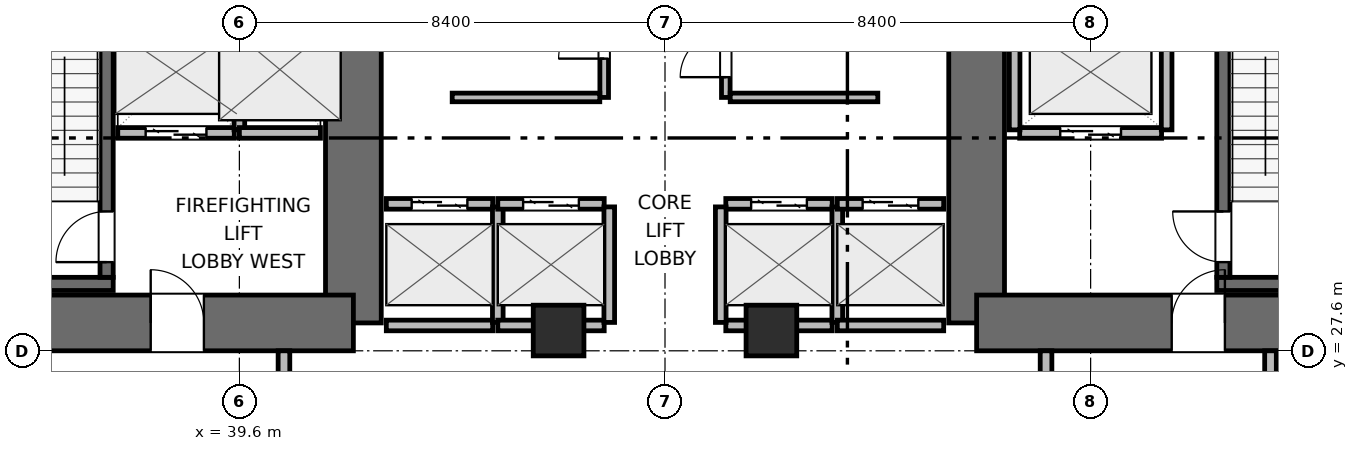
"""IFC4 building model, lengths in metres.
Left out: names, types, materials, properties, quantities, classifications, styles, units other than length and angle.
Written with IfcOpenShell. Run it as: python <this file> out.ifc"""

import sys

from ifc_helpers import new_model, si_unit, direction, frame, frame_2d, origin, origin_2d, place, context, subcontext, project, spatial, rectangle, extrude, element, fill, save


model = new_model("IFC4")
c1 = context("Model", 3, precision=1e-05, world=origin(), true_north=direction((0.0, 1.0)))
c2 = subcontext(c1, "Body", "Model", "MODEL_VIEW")
j1 = project(units=[si_unit("LENGTHUNIT", "METRE"), si_unit("PLANEANGLEUNIT", "RADIAN")], contexts=[c1])
p1 = place(None, origin())
s1 = spatial("IfcSite", under=j1, at=p1, CompositionType="ELEMENT")
p2 = place(p1, origin())
s2 = spatial("IfcBuilding", under=s1, at=p2, CompositionType="ELEMENT")
p3 = place(p2, origin())
s3 = spatial("IfcBuildingStorey", under=s2, at=p3, CompositionType="ELEMENT", Elevation=0.0)
p4 = place(p3, frame((41.85, 28.15, 0.0), z_axis=(0.0, 0.0, 1.0), x_axis=(0.0, 1.0, 0.0)))
e1 = element("IfcWall", 1, at=p4, inside=s3, PredefinedType="SHEAR", context=c2, shape_type="SweptSolid", body=[
    extrude(rectangle(XDim=6.25, YDim=1.1, at=frame_2d((3.125, 0.0))), origin(), (0.0, 0.0, 1.0), 4.5),
])
p5 = place(p3, frame((32.95, 28.15, 0.0), z_axis=(0.0, 0.0, 1.0), x_axis=(1.0, 0.0, 0.0)))
e2 = element("IfcWall", 2, at=p5, inside=s3, PredefinedType="SHEAR", context=c2, shape_type="SweptSolid", body=[
    extrude(rectangle(XDim=8.9, YDim=1.1, at=frame_2d((4.45, 0.0))), origin(), (0.0, 0.0, 1.0), 4.5),
])
p6 = place(p5, frame((4.9, 0.0, 0.0)))
e3 = element("IfcOpeningElement", 3, at=p6, cuts=e2, PredefinedType="OPENING", context=c2, shape_type="SweptSolid", body=[
    extrude(rectangle(XDim=1.05, YDim=2.04, at=frame_2d((0.525, 1.02))), frame((0.0, 0.56, 0.0), z_axis=(0.0, -1.0, 0.0), x_axis=(1.0, 0.0, 0.0)), (0.0, 0.0, 1.0), 1.12),
])
p7 = place(p3, frame((54.15, 28.15, 0.0), z_axis=(0.0, 0.0, 1.0), x_axis=(0.0, 1.0, 0.0)))
e4 = element("IfcWall", 4, at=p7, inside=s3, PredefinedType="SHEAR", context=c2, shape_type="SweptSolid", body=[
    extrude(rectangle(XDim=7.65, YDim=1.1, at=frame_2d((3.825, 0.0))), origin(), (0.0, 0.0, 1.0), 4.5),
])
p8 = place(p3, frame((54.15, 28.15, 0.0), z_axis=(0.0, 0.0, 1.0), x_axis=(1.0, 0.0, 0.0)))
e5 = element("IfcWall", 5, at=p8, inside=s3, PredefinedType="SHEAR", context=c2, shape_type="SweptSolid", body=[
    extrude(rectangle(XDim=8.9, YDim=1.1, at=frame_2d((4.45, 0.0))), origin(), (0.0, 0.0, 1.0), 4.5),
])
p9 = place(p8, frame((3.85, 0.0, 0.0)))
e6 = element("IfcOpeningElement", 6, at=p9, cuts=e5, PredefinedType="OPENING", context=c2, shape_type="SweptSolid", body=[
    extrude(rectangle(XDim=1.05, YDim=2.04, at=frame_2d((0.525, 1.02))), frame((0.0, 0.56, 0.0), z_axis=(0.0, -1.0, 0.0), x_axis=(1.0, 0.0, 0.0)), (0.0, 0.0, 1.0), 1.12),
])
p10 = place(p3, frame((33.5, 28.92, 0.0), z_axis=(0.0, 0.0, 1.0), x_axis=(1.0, 0.0, 0.0)))
e7 = element("IfcWall", 7, at=p10, inside=s3, PredefinedType="SHEAR", context=c2, shape_type="SweptSolid", body=[
    extrude(rectangle(XDim=3.61, YDim=0.26, at=frame_2d((1.805, 0.0))), origin(), (0.0, 0.0, 1.0), 4.5),
])
p11 = place(p3, frame((36.98, 29.05, 0.0), z_axis=(0.0, 0.0, 1.0), x_axis=(0.0, 1.0, 0.0)))
e8 = element("IfcWall", 8, at=p11, inside=s3, PredefinedType="SHEAR", context=c2, shape_type="SweptSolid", body=[
    extrude(rectangle(XDim=7.6, YDim=0.26, at=frame_2d((3.8, 0.0))), origin(), (0.0, 0.0, 1.0), 4.5),
])
p12 = place(p11, frame((0.3, 0.0, 0.0)))
e9 = element("IfcOpeningElement", 9, at=p12, cuts=e8, PredefinedType="OPENING", context=c2, shape_type="SweptSolid", body=[
    extrude(rectangle(XDim=1.0, YDim=2.04, at=frame_2d((0.5, 1.02))), frame((0.0, 0.14, 0.0), z_axis=(0.0, -1.0, 0.0), x_axis=(1.0, 0.0, 0.0)), (0.0, 0.0, 1.0), 0.28),
])
p13 = place(p3, frame((58.89, 28.92, 0.0), z_axis=(0.0, 0.0, 1.0), x_axis=(1.0, 0.0, 0.0)))
e10 = element("IfcWall", 10, at=p13, inside=s3, PredefinedType="SHEAR", context=c2, shape_type="SweptSolid", body=[
    extrude(rectangle(XDim=3.61, YDim=0.26, at=frame_2d((1.805, 0.0))), origin(), (0.0, 0.0, 1.0), 4.5),
])
p14 = place(p3, frame((59.02, 29.05, 0.0), z_axis=(0.0, 0.0, 1.0), x_axis=(0.0, 1.0, 0.0)))
e11 = element("IfcWall", 11, at=p14, inside=s3, PredefinedType="SHEAR", context=c2, shape_type="SweptSolid", body=[
    extrude(rectangle(XDim=7.6, YDim=0.26, at=frame_2d((3.8, 0.0))), origin(), (0.0, 0.0, 1.0), 4.5),
])
p15 = place(p14, frame((0.3, 0.0, 0.0)))
e12 = element("IfcOpeningElement", 12, at=p15, cuts=e11, PredefinedType="OPENING", context=c2, shape_type="SweptSolid", body=[
    extrude(rectangle(XDim=1.0, YDim=2.04, at=frame_2d((0.5, 1.02))), frame((0.0, 0.14, 0.0), z_axis=(0.0, -1.0, 0.0), x_axis=(1.0, 0.0, 0.0)), (0.0, 0.0, 1.0), 0.28),
])
for number, where, z_axis, x_axis in (
    (13, (45.9, 28.0, 0.0), (0.0, 0.0, 1.0), (1.0, 0.0, 0.0)),
    (14, (50.1, 28.0, 0.0), (0.0, 0.0, 1.0), (1.0, 0.0, 0.0)),
):
    element("IfcColumn", number, at=place(p3, frame(where, z_axis=z_axis, x_axis=x_axis)), inside=s3, PredefinedType="COLUMN", context=c2, shape_type="SweptSolid", body=[
        extrude(rectangle(XDim=1.0, YDim=1.0, at=origin_2d()), origin(), (0.0, 0.0, 1.0), 4.5),
    ])
p16 = place(p3, frame((37.2, 31.9, 0.0), z_axis=(0.0, 0.0, 1.0), x_axis=(1.0, 0.0, 0.0)))
e15 = element("IfcWall", 15, at=p16, inside=s3, PredefinedType="PARTITIONING", context=c2, shape_type="SweptSolid", body=[
    extrude(rectangle(XDim=2.3, YDim=0.21, at=frame_2d((1.15, 0.0))), origin(), (0.0, 0.0, 1.0), 4.18),
])
p17 = place(p16, frame((0.55, 0.0, 0.0)))
e16 = element("IfcOpeningElement", 16, at=p17, cuts=e15, PredefinedType="OPENING", context=c2, shape_type="SweptSolid", body=[
    extrude(rectangle(XDim=1.2, YDim=2.04, at=frame_2d((0.6, 1.02))), frame((0.0, 0.115, 0.0), z_axis=(0.0, -1.0, 0.0), x_axis=(1.0, 0.0, 0.0)), (0.0, 0.0, 1.0), 0.23),
])
p18 = place(p3, frame((39.6, 31.96, 0.0), z_axis=(0.0, 0.0, 1.0), x_axis=(0.0, 1.0, 0.0)))
e17 = element("IfcWall", 17, at=p18, inside=s3, PredefinedType="PARTITIONING", context=c2, shape_type="SweptSolid", body=[
    extrude(rectangle(XDim=2.28, YDim=0.21, at=frame_2d((1.14, 0.0))), origin(), (0.0, 0.0, 1.0), 4.18),
])
p19 = place(p3, frame((55.0, 31.9, 0.0), z_axis=(0.0, 0.0, 1.0), x_axis=(1.0, 0.0, 0.0)))
e18 = element("IfcWall", 18, at=p19, inside=s3, PredefinedType="PARTITIONING", context=c2, shape_type="SweptSolid", body=[
    extrude(rectangle(XDim=2.8, YDim=0.21, at=frame_2d((1.4, 0.0))), origin(), (0.0, 0.0, 1.0), 4.18),
])
p20 = place(p19, frame((0.8, 0.0, 0.0)))
e19 = element("IfcOpeningElement", 19, at=p20, cuts=e18, PredefinedType="OPENING", context=c2, shape_type="SweptSolid", body=[
    extrude(rectangle(XDim=1.2, YDim=2.04, at=frame_2d((0.6, 1.02))), frame((0.0, 0.115, 0.0), z_axis=(0.0, -1.0, 0.0), x_axis=(1.0, 0.0, 0.0)), (0.0, 0.0, 1.0), 0.23),
])
for number, where, z_axis, x_axis in (
    (20, (54.9, 31.96, 0.0), (0.0, 0.0, 1.0), (0.0, 1.0, 0.0)),
    (21, (57.9, 31.96, 0.0), (0.0, 0.0, 1.0), (0.0, 1.0, 0.0)),
):
    element("IfcWall", number, at=place(p3, frame(where, z_axis=z_axis, x_axis=x_axis)), inside=s3, PredefinedType="PARTITIONING", context=c2, shape_type="SweptSolid", body=[
        extrude(rectangle(XDim=2.28, YDim=0.21, at=frame_2d((1.14, 0.0))), origin(), (0.0, 0.0, 1.0), 4.18),
    ])
p21 = place(p3, frame((39.6, 31.9, 0.0), z_axis=(0.0, 0.0, 1.0), x_axis=(1.0, 0.0, 0.0)))
e22 = element("IfcWall", 22, at=p21, inside=s3, PredefinedType="PARTITIONING", context=c2, shape_type="SweptSolid", body=[
    extrude(rectangle(XDim=1.6, YDim=0.21, at=frame_2d((0.8, 0.0))), origin(), (0.0, 0.0, 1.0), 4.18),
])
p22 = place(p3, frame((42.5, 30.5, 0.0), z_axis=(0.0, 0.0, 1.0), x_axis=(1.0, 0.0, 0.0)))
e23 = element("IfcWall", 23, at=p22, inside=s3, PredefinedType="PARTITIONING", context=c2, shape_type="SweptSolid", body=[
    extrude(rectangle(XDim=2.1, YDim=0.21, at=frame_2d((1.05, 0.0))), origin(), (0.0, 0.0, 1.0), 4.18),
])
p23 = place(p22, frame((0.5, 0.0, 0.0)))
e24 = element("IfcOpeningElement", 24, at=p23, cuts=e23, PredefinedType="OPENING", context=c2, shape_type="SweptSolid", body=[
    extrude(rectangle(XDim=1.1, YDim=2.04, at=frame_2d((0.55, 1.02))), frame((0.0, 0.115, 0.0), z_axis=(0.0, -1.0, 0.0), x_axis=(1.0, 0.0, 0.0)), (0.0, 0.0, 1.0), 0.23),
])
p24 = place(p3, frame((42.5, 28.1, 0.0), z_axis=(0.0, 0.0, 1.0), x_axis=(1.0, 0.0, 0.0)))
e25 = element("IfcWall", 25, at=p24, inside=s3, PredefinedType="PARTITIONING", context=c2, shape_type="SweptSolid", body=[
    extrude(rectangle(XDim=2.1, YDim=0.21, at=frame_2d((1.05, 0.0))), origin(), (0.0, 0.0, 1.0), 3.065),
])
p25 = place(p3, frame((44.7, 28.16, 0.0), z_axis=(0.0, 0.0, 1.0), x_axis=(0.0, 1.0, 0.0)))
e26 = element("IfcWall", 26, at=p25, inside=s3, PredefinedType="PARTITIONING", context=c2, shape_type="SweptSolid", body=[
    extrude(rectangle(XDim=2.28, YDim=0.21, at=frame_2d((1.14, 0.0))), origin(), (0.0, 0.0, 1.0), 4.18),
])
p26 = place(p3, frame((44.7, 30.5, 0.0), z_axis=(0.0, 0.0, 1.0), x_axis=(1.0, 0.0, 0.0)))
e27 = element("IfcWall", 27, at=p26, inside=s3, PredefinedType="PARTITIONING", context=c2, shape_type="SweptSolid", body=[
    extrude(rectangle(XDim=2.1, YDim=0.21, at=frame_2d((1.05, 0.0))), origin(), (0.0, 0.0, 1.0), 4.18),
])
p27 = place(p26, frame((0.5, 0.0, 0.0)))
e28 = element("IfcOpeningElement", 28, at=p27, cuts=e27, PredefinedType="OPENING", context=c2, shape_type="SweptSolid", body=[
    extrude(rectangle(XDim=1.1, YDim=2.04, at=frame_2d((0.55, 1.02))), frame((0.0, 0.115, 0.0), z_axis=(0.0, -1.0, 0.0), x_axis=(1.0, 0.0, 0.0)), (0.0, 0.0, 1.0), 0.23),
])
p28 = place(p3, frame((44.7, 28.1, 0.0), z_axis=(0.0, 0.0, 1.0), x_axis=(1.0, 0.0, 0.0)))
e29 = element("IfcWall", 29, at=p28, inside=s3, PredefinedType="PARTITIONING", context=c2, shape_type="SweptSolid", body=[
    extrude(rectangle(XDim=2.1, YDim=0.21, at=frame_2d((1.05, 0.0))), origin(), (0.0, 0.0, 1.0), 3.065),
])
p29 = place(p3, frame((46.9, 28.16, 0.0), z_axis=(0.0, 0.0, 1.0), x_axis=(0.0, 1.0, 0.0)))
e30 = element("IfcWall", 30, at=p29, inside=s3, PredefinedType="PARTITIONING", context=c2, shape_type="SweptSolid", body=[
    extrude(rectangle(XDim=2.28, YDim=0.21, at=frame_2d((1.14, 0.0))), origin(), (0.0, 0.0, 1.0), 4.18),
])
p30 = place(p3, frame((49.2, 30.5, 0.0), z_axis=(0.0, 0.0, 1.0), x_axis=(1.0, 0.0, 0.0)))
e31 = element("IfcWall", 31, at=p30, inside=s3, PredefinedType="PARTITIONING", context=c2, shape_type="SweptSolid", body=[
    extrude(rectangle(XDim=2.1, YDim=0.21, at=frame_2d((1.05, 0.0))), origin(), (0.0, 0.0, 1.0), 4.18),
])
p31 = place(p30, frame((0.5, 0.0, 0.0)))
e32 = element("IfcOpeningElement", 32, at=p31, cuts=e31, PredefinedType="OPENING", context=c2, shape_type="SweptSolid", body=[
    extrude(rectangle(XDim=1.1, YDim=2.04, at=frame_2d((0.55, 1.02))), frame((0.0, 0.115, 0.0), z_axis=(0.0, -1.0, 0.0), x_axis=(1.0, 0.0, 0.0)), (0.0, 0.0, 1.0), 0.23),
])
p32 = place(p3, frame((49.2, 28.1, 0.0), z_axis=(0.0, 0.0, 1.0), x_axis=(1.0, 0.0, 0.0)))
e33 = element("IfcWall", 33, at=p32, inside=s3, PredefinedType="PARTITIONING", context=c2, shape_type="SweptSolid", body=[
    extrude(rectangle(XDim=2.1, YDim=0.21, at=frame_2d((1.05, 0.0))), origin(), (0.0, 0.0, 1.0), 3.065),
])
for number, where, z_axis, x_axis in (
    (34, (49.1, 28.16, 0.0), (0.0, 0.0, 1.0), (0.0, 1.0, 0.0)),
    (35, (51.4, 28.16, 0.0), (0.0, 0.0, 1.0), (0.0, 1.0, 0.0)),
):
    element("IfcWall", number, at=place(p3, frame(where, z_axis=z_axis, x_axis=x_axis)), inside=s3, PredefinedType="PARTITIONING", context=c2, shape_type="SweptSolid", body=[
        extrude(rectangle(XDim=2.28, YDim=0.21, at=frame_2d((1.14, 0.0))), origin(), (0.0, 0.0, 1.0), 4.18),
    ])
p33 = place(p3, frame((51.4, 30.5, 0.0), z_axis=(0.0, 0.0, 1.0), x_axis=(1.0, 0.0, 0.0)))
e36 = element("IfcWall", 36, at=p33, inside=s3, PredefinedType="PARTITIONING", context=c2, shape_type="SweptSolid", body=[
    extrude(rectangle(XDim=2.1, YDim=0.21, at=frame_2d((1.05, 0.0))), origin(), (0.0, 0.0, 1.0), 4.18),
])
p34 = place(p33, frame((0.5, 0.0, 0.0)))
e37 = element("IfcOpeningElement", 37, at=p34, cuts=e36, PredefinedType="OPENING", context=c2, shape_type="SweptSolid", body=[
    extrude(rectangle(XDim=1.1, YDim=2.04, at=frame_2d((0.55, 1.02))), frame((0.0, 0.115, 0.0), z_axis=(0.0, -1.0, 0.0), x_axis=(1.0, 0.0, 0.0)), (0.0, 0.0, 1.0), 0.23),
])
p35 = place(p3, frame((51.4, 28.1, 0.0), z_axis=(0.0, 0.0, 1.0), x_axis=(1.0, 0.0, 0.0)))
e38 = element("IfcWall", 38, at=p35, inside=s3, PredefinedType="PARTITIONING", context=c2, shape_type="SweptSolid", body=[
    extrude(rectangle(XDim=2.1, YDim=0.21, at=frame_2d((1.05, 0.0))), origin(), (0.0, 0.0, 1.0), 3.065),
])
p36 = place(p3, frame((40.48, 0.285, 0.0), z_axis=(0.0, 0.0, 1.0), x_axis=(0.0, 1.0, 0.0)))
e39 = element("IfcWall", 39, at=p36, inside=s3, PredefinedType="PARTITIONING", context=c2, shape_type="SweptSolid", body=[
    extrude(rectangle(XDim=27.315, YDim=0.23, at=frame_2d((13.658, 0.0))), origin(), (0.0, 0.0, 1.0), 4.18),
])
p37 = place(p36, frame((11.0, 0.0, 0.0)))
e40 = element("IfcOpeningElement", 40, at=p37, cuts=e39, PredefinedType="OPENING", context=c2, shape_type="SweptSolid", body=[
    extrude(rectangle(XDim=1.8, YDim=2.06, at=frame_2d((0.9, 1.03))), frame((0.0, 0.125, 0.0), z_axis=(0.0, -1.0, 0.0), x_axis=(1.0, 0.0, 0.0)), (0.0, 0.0, 1.0), 0.25),
])
p38 = place(p3, frame((55.52, 0.285, 0.0), z_axis=(0.0, 0.0, 1.0), x_axis=(0.0, 1.0, 0.0)))
e41 = element("IfcWall", 41, at=p38, inside=s3, PredefinedType="PARTITIONING", context=c2, shape_type="SweptSolid", body=[
    extrude(rectangle(XDim=27.315, YDim=0.23, at=frame_2d((13.658, 0.0))), origin(), (0.0, 0.0, 1.0), 4.18),
])
p39 = place(p38, frame((11.0, 0.0, 0.0)))
e42 = element("IfcOpeningElement", 42, at=p39, cuts=e41, PredefinedType="OPENING", context=c2, shape_type="SweptSolid", body=[
    extrude(rectangle(XDim=1.8, YDim=2.06, at=frame_2d((0.9, 1.03))), frame((0.0, 0.125, 0.0), z_axis=(0.0, -1.0, 0.0), x_axis=(1.0, 0.0, 0.0)), (0.0, 0.0, 1.0), 0.25),
])
p40 = place(p3, frame((59.95, 0.355, 0.0), z_axis=(0.0, 0.0, 1.0), x_axis=(0.0, 1.0, 0.0)))
e43 = element("IfcWall", 43, at=p40, inside=s3, PredefinedType="PARTITIONING", context=c2, shape_type="SweptSolid", body=[
    extrude(rectangle(XDim=27.245, YDim=0.23, at=frame_2d((13.623, 0.0))), origin(), (0.0, 0.0, 1.0), 4.18),
])
p41 = place(p40, frame((13.5, 0.0, 0.0)))
e44 = element("IfcOpeningElement", 44, at=p41, cuts=e43, PredefinedType="OPENING", context=c2, shape_type="SweptSolid", body=[
    extrude(rectangle(XDim=1.0, YDim=2.04, at=frame_2d((0.5, 1.02))), frame((0.0, 0.125, 0.0), z_axis=(0.0, -1.0, 0.0), x_axis=(1.0, 0.0, 0.0)), (0.0, 0.0, 1.0), 0.25),
])
p42 = place(p3, frame((46.8, 32.6, 0.0), z_axis=(0.0, 0.0, 1.0), x_axis=(0.0, 1.0, 0.0)))
e45 = element("IfcWall", 45, at=p42, inside=s3, PredefinedType="PARTITIONING", context=c2, shape_type="SweptSolid", body=[
    extrude(rectangle(XDim=3.8, YDim=0.17, at=frame_2d((1.9, 0.0))), origin(), (0.0, 0.0, 1.0), 4.18),
])
p43 = place(p42, frame((0.766, 0.0, 0.0)))
e46 = element("IfcOpeningElement", 46, at=p43, cuts=e45, PredefinedType="OPENING", context=c2, shape_type="SweptSolid", body=[
    extrude(rectangle(XDim=0.9, YDim=2.02, at=frame_2d((0.45, 1.01))), frame((0.0, 0.095, 0.0), z_axis=(0.0, -1.0, 0.0), x_axis=(1.0, 0.0, 0.0)), (0.0, 0.0, 1.0), 0.19),
])
p44 = place(p42, frame((2.666, 0.0, 0.0)))
e47 = element("IfcOpeningElement", 47, at=p44, cuts=e45, PredefinedType="OPENING", context=c2, shape_type="SweptSolid", body=[
    extrude(rectangle(XDim=0.9, YDim=2.02, at=frame_2d((0.45, 1.01))), frame((0.0, 0.095, 0.0), z_axis=(0.0, -1.0, 0.0), x_axis=(1.0, 0.0, 0.0)), (0.0, 0.0, 1.0), 0.19),
])
p45 = place(p3, frame((43.8, 32.6, 0.0), z_axis=(0.0, 0.0, 1.0), x_axis=(1.0, 0.0, 0.0)))
e48 = element("IfcWall", 48, at=p45, inside=s3, PredefinedType="PARTITIONING", context=c2, shape_type="SweptSolid", body=[
    extrude(rectangle(XDim=2.913, YDim=0.17, at=frame_2d((1.457, 0.0))), origin(), (0.0, 0.0, 1.0), 4.18),
])
p46 = place(p3, frame((49.2, 32.6, 0.0), z_axis=(0.0, 0.0, 1.0), x_axis=(0.0, 1.0, 0.0)))
e49 = element("IfcWall", 49, at=p46, inside=s3, PredefinedType="PARTITIONING", context=c2, shape_type="SweptSolid", body=[
    extrude(rectangle(XDim=3.4, YDim=0.17, at=frame_2d((1.7, 0.0))), origin(), (0.0, 0.0, 1.0), 4.18),
])
p47 = place(p46, frame((0.4, 0.0, 0.0)))
e50 = element("IfcOpeningElement", 50, at=p47, cuts=e49, PredefinedType="OPENING", context=c2, shape_type="SweptSolid", body=[
    extrude(rectangle(XDim=0.9, YDim=2.02, at=frame_2d((0.45, 1.01))), frame((0.0, 0.095, 0.0), z_axis=(0.0, -1.0, 0.0), x_axis=(1.0, 0.0, 0.0)), (0.0, 0.0, 1.0), 0.19),
])
p48 = place(p46, frame((2.1, 0.0, 0.0)))
e51 = element("IfcOpeningElement", 51, at=p48, cuts=e49, PredefinedType="OPENING", context=c2, shape_type="SweptSolid", body=[
    extrude(rectangle(XDim=0.9, YDim=2.02, at=frame_2d((0.45, 1.01))), frame((0.0, 0.095, 0.0), z_axis=(0.0, -1.0, 0.0), x_axis=(1.0, 0.0, 0.0)), (0.0, 0.0, 1.0), 0.19),
])
p49 = place(p3, frame((49.287, 32.6, 0.0), z_axis=(0.0, 0.0, 1.0), x_axis=(1.0, 0.0, 0.0)))
e52 = element("IfcWall", 52, at=p49, inside=s3, PredefinedType="PARTITIONING", context=c2, shape_type="SweptSolid", body=[
    extrude(rectangle(XDim=2.913, YDim=0.17, at=frame_2d((1.457, 0.0))), origin(), (0.0, 0.0, 1.0), 4.18),
])
p50 = place(p12, origin())
e53 = element("IfcDoor", 53, at=p50, inside=s3, OperationType="SINGLE_SWING_LEFT", PredefinedType="DOOR", context=c2, shape_type="SweptSolid", body=[
    extrude(rectangle(XDim=1.0, YDim=2.04, at=frame_2d((0.5, 1.02))), frame((0.0, 0.025, 0.0), z_axis=(0.0, -1.0, 0.0), x_axis=(1.0, 0.0, 0.0)), (0.0, 0.0, 1.0), 0.05),
])
fill(e9, e53)
p51 = place(p15, origin())
e54 = element("IfcDoor", 54, at=p51, inside=s3, OperationType="SINGLE_SWING_RIGHT", PredefinedType="DOOR", context=c2, shape_type="SweptSolid", body=[
    extrude(rectangle(XDim=1.0, YDim=2.04, at=frame_2d((0.5, 1.02))), frame((0.0, 0.025, 0.0), z_axis=(0.0, -1.0, 0.0), x_axis=(1.0, 0.0, 0.0)), (0.0, 0.0, 1.0), 0.05),
])
fill(e12, e54)
p52 = place(p17, origin())
e55 = element("IfcDoor", 55, at=p52, inside=s3, OperationType="DOUBLE_DOOR_SLIDING", PredefinedType="DOOR", context=c2, shape_type="SweptSolid", body=[
    extrude(rectangle(XDim=1.2, YDim=2.04, at=frame_2d((0.6, 1.02))), frame((0.0, 0.025, 0.0), z_axis=(0.0, -1.0, 0.0), x_axis=(1.0, 0.0, 0.0)), (0.0, 0.0, 1.0), 0.05),
])
fill(e16, e55)
p53 = place(p20, origin())
e56 = element("IfcDoor", 56, at=p53, inside=s3, OperationType="DOUBLE_DOOR_SLIDING", PredefinedType="DOOR", context=c2, shape_type="SweptSolid", body=[
    extrude(rectangle(XDim=1.2, YDim=2.04, at=frame_2d((0.6, 1.02))), frame((0.0, 0.025, 0.0), z_axis=(0.0, -1.0, 0.0), x_axis=(1.0, 0.0, 0.0)), (0.0, 0.0, 1.0), 0.05),
])
fill(e19, e56)
p54 = place(p23, origin())
e57 = element("IfcDoor", 57, at=p54, inside=s3, OperationType="DOUBLE_DOOR_SLIDING", PredefinedType="DOOR", context=c2, shape_type="SweptSolid", body=[
    extrude(rectangle(XDim=1.1, YDim=2.04, at=frame_2d((0.55, 1.02))), frame((0.0, 0.025, 0.0), z_axis=(0.0, -1.0, 0.0), x_axis=(1.0, 0.0, 0.0)), (0.0, 0.0, 1.0), 0.05),
])
fill(e24, e57)
p55 = place(p27, origin())
e58 = element("IfcDoor", 58, at=p55, inside=s3, OperationType="DOUBLE_DOOR_SLIDING", PredefinedType="DOOR", context=c2, shape_type="SweptSolid", body=[
    extrude(rectangle(XDim=1.1, YDim=2.04, at=frame_2d((0.55, 1.02))), frame((0.0, 0.025, 0.0), z_axis=(0.0, -1.0, 0.0), x_axis=(1.0, 0.0, 0.0)), (0.0, 0.0, 1.0), 0.05),
])
fill(e28, e58)
p56 = place(p31, origin())
e59 = element("IfcDoor", 59, at=p56, inside=s3, OperationType="DOUBLE_DOOR_SLIDING", PredefinedType="DOOR", context=c2, shape_type="SweptSolid", body=[
    extrude(rectangle(XDim=1.1, YDim=2.04, at=frame_2d((0.55, 1.02))), frame((0.0, 0.025, 0.0), z_axis=(0.0, -1.0, 0.0), x_axis=(1.0, 0.0, 0.0)), (0.0, 0.0, 1.0), 0.05),
])
fill(e32, e59)
p57 = place(p34, origin())
e60 = element("IfcDoor", 60, at=p57, inside=s3, OperationType="DOUBLE_DOOR_SLIDING", PredefinedType="DOOR", context=c2, shape_type="SweptSolid", body=[
    extrude(rectangle(XDim=1.1, YDim=2.04, at=frame_2d((0.55, 1.02))), frame((0.0, 0.025, 0.0), z_axis=(0.0, -1.0, 0.0), x_axis=(1.0, 0.0, 0.0)), (0.0, 0.0, 1.0), 0.05),
])
fill(e37, e60)
p58 = place(p6, origin())
e61 = element("IfcDoor", 61, at=p58, inside=s3, OperationType="SINGLE_SWING_LEFT", PredefinedType="DOOR", context=c2, shape_type="SweptSolid", body=[
    extrude(rectangle(XDim=1.05, YDim=2.04, at=frame_2d((0.525, 1.02))), frame((0.0, 0.025, 0.0), z_axis=(0.0, -1.0, 0.0), x_axis=(1.0, 0.0, 0.0)), (0.0, 0.0, 1.0), 0.05),
])
fill(e3, e61)
p59 = place(p9, origin())
e62 = element("IfcDoor", 62, at=p59, inside=s3, OperationType="SINGLE_SWING_RIGHT", PredefinedType="DOOR", context=c2, shape_type="SweptSolid", body=[
    extrude(rectangle(XDim=1.05, YDim=2.04, at=frame_2d((0.525, 1.02))), frame((0.0, 0.025, 0.0), z_axis=(0.0, -1.0, 0.0), x_axis=(1.0, 0.0, 0.0)), (0.0, 0.0, 1.0), 0.05),
])
fill(e6, e62)
p60 = place(p43, origin())
e63 = element("IfcDoor", 63, at=p60, inside=s3, OperationType="SINGLE_SWING_LEFT", PredefinedType="DOOR", context=c2, shape_type="SweptSolid", body=[
    extrude(rectangle(XDim=0.9, YDim=2.02, at=frame_2d((0.45, 1.01))), frame((0.0, 0.025, 0.0), z_axis=(0.0, -1.0, 0.0), x_axis=(1.0, 0.0, 0.0)), (0.0, 0.0, 1.0), 0.05),
])
fill(e46, e63)
p61 = place(p47, origin())
e64 = element("IfcDoor", 64, at=p61, inside=s3, OperationType="SINGLE_SWING_LEFT", PredefinedType="DOOR", context=c2, shape_type="SweptSolid", body=[
    extrude(rectangle(XDim=0.9, YDim=2.02, at=frame_2d((0.45, 1.01))), frame((0.0, 0.025, 0.0), z_axis=(0.0, -1.0, 0.0), x_axis=(1.0, 0.0, 0.0)), (0.0, 0.0, 1.0), 0.05),
])
fill(e50, e64)
save(model, sys.argv[1])
